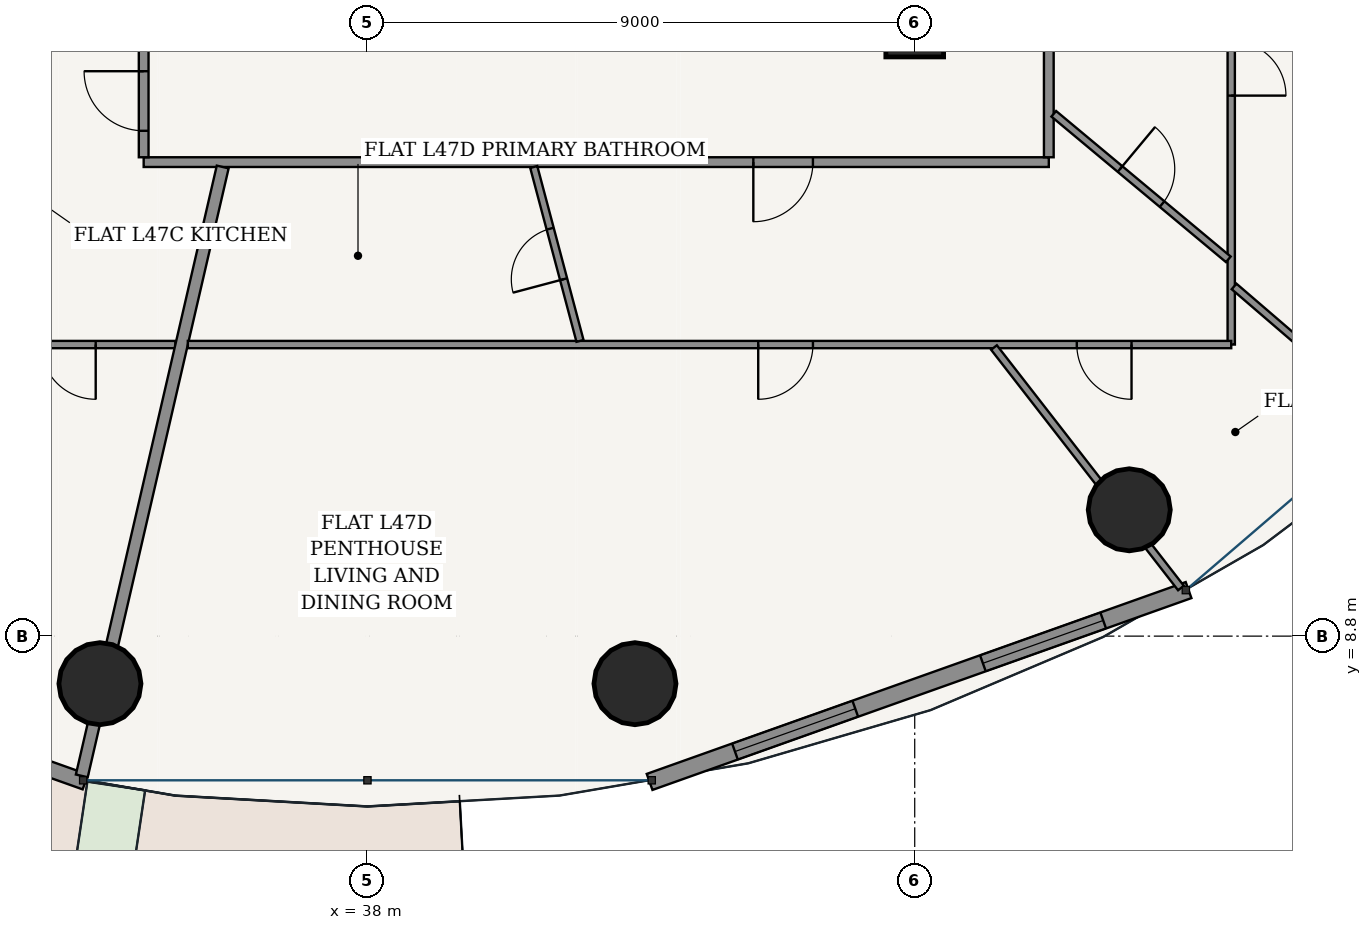
"""IFC4 building model, lengths in metres.
Left out: names, types, materials, properties, quantities, classifications, styles, units other than length and angle.
Written with IfcOpenShell. Run it as: python <this file> out.ifc"""

import sys

from ifc_helpers import new_model, si_unit, direction, frame, frame_2d, origin, origin_2d, place, context, subcontext, project, spatial, rectangle, hollow_circle, extrude, source, transform, mapped, element, fill, save


model = new_model("IFC4")
c1 = context("Model", 3, precision=1e-05, world=origin(), true_north=direction((-0.2419218956, 0.970295726276)))
c2 = subcontext(c1, "Body", "Model", "MODEL_VIEW")
j1 = project(units=[si_unit("LENGTHUNIT", "METRE"), si_unit("PLANEANGLEUNIT", "RADIAN")], contexts=[c1])
p1 = place(None, origin())
s1 = spatial("IfcSite", under=j1, at=p1, CompositionType="ELEMENT")
p2 = place(p1, origin())
s2 = spatial("IfcBuilding", under=s1, at=p2, CompositionType="ELEMENT")
p3 = place(p2, frame((0.0, 0.0, 178.6)))
s3 = spatial("IfcBuildingStorey", under=s2, at=p3, CompositionType="ELEMENT", Elevation=178.6)
p4 = place(p3, frame((47.0, 18.8, 0.0), z_axis=(0.0, 0.0, 1.0), x_axis=(1.0, 0.0, 0.0)))
e1 = element("IfcColumn", 1, at=p4, inside=s3, PredefinedType="COLUMN", context=c2, shape_type="SweptSolid", body=[
    extrude(rectangle(XDim=0.95, YDim=0.95, at=origin_2d()), origin(), (0.0, 0.0, 1.0), 3.6),
])
for number, where, z_axis, x_axis in (
    (2, (33.601, 8.018, 0.0), (0.0, 0.0, 1.0), (1.0, 0.0, 0.0)),
    (3, (42.399, 8.018, 0.0), (0.0, 0.0, 1.0), (1.0, 0.0, 0.0)),
    (4, (50.528, 10.877, 0.0), (0.0, 0.0, 1.0), (1.0, 0.0, 0.0)),
):
    element("IfcColumn", number, at=place(p3, frame(where, z_axis=z_axis, x_axis=x_axis)), inside=s3, PredefinedType="COLUMN", context=c2, shape_type="SweptSolid", body=[
        extrude(hollow_circle(Radius=0.675, WallThickness=0.042, at=origin_2d()), origin(), (0.0, 0.0, 1.0), 3.6),
    ])
p5 = place(p3, frame((24.497, 9.557, 0.0), z_axis=(0.0, 0.0, 1.0), x_axis=(0.942103604331, -0.335321932934, 0.0)))
e5 = element("IfcWall", 5, at=p5, inside=s3, PredefinedType="SOLIDWALL", context=c2, shape_type="SweptSolid", body=[
    extrude(rectangle(XDim=9.408, YDim=0.26, at=frame_2d((4.704, 0.0))), origin(), (0.0, 0.0, 1.0), 3.33),
])
p6 = place(p5, frame((4.029, 0.0, 0.0)))
e6 = element("IfcOpeningElement", 6, at=p6, cuts=e5, PredefinedType="OPENING", context=c2, shape_type="SweptSolid", body=[
    extrude(rectangle(XDim=1.35, YDim=2.2, at=frame_2d((0.675, 1.1))), frame((0.0, 0.14, 0.0), z_axis=(0.0, -1.0, 0.0), x_axis=(1.0, 0.0, 0.0)), (0.0, 0.0, 1.0), 0.28),
])
p7 = place(p3, frame((42.64, 6.402, 0.0), z_axis=(0.0, 0.0, 1.0), x_axis=(0.942103604331, 0.335321932934, 0.0)))
e7 = element("IfcWall", 7, at=p7, inside=s3, PredefinedType="SOLIDWALL", context=c2, shape_type="SweptSolid", body=[
    extrude(rectangle(XDim=9.408, YDim=0.28, at=frame_2d((4.704, 0.0))), origin(), (0.0, 0.0, 1.0), 3.33),
])
p8 = place(p7, frame((1.49, 0.0, 0.85)))
e8 = element("IfcOpeningElement", 8, at=p8, cuts=e7, PredefinedType="OPENING", context=c2, shape_type="SweptSolid", body=[
    extrude(rectangle(XDim=2.1, YDim=1.95, at=frame_2d((1.05, 0.975))), frame((0.0, 0.15, 0.0), z_axis=(0.0, -1.0, 0.0), x_axis=(1.0, 0.0, 0.0)), (0.0, 0.0, 1.0), 0.3),
])
p9 = place(p7, frame((5.818, 0.0, 0.85)))
e9 = element("IfcOpeningElement", 9, at=p9, cuts=e7, PredefinedType="OPENING", context=c2, shape_type="SweptSolid", body=[
    extrude(rectangle(XDim=2.1, YDim=1.95, at=frame_2d((1.05, 0.975))), frame((0.0, 0.15, 0.0), z_axis=(0.0, -1.0, 0.0), x_axis=(1.0, 0.0, 0.0)), (0.0, 0.0, 1.0), 0.3),
])
p10 = place(p3, frame((34.32, 16.595, 0.0), z_axis=(0.0, 0.0, 1.0), x_axis=(1.0, 0.0, 0.0)))
e10 = element("IfcWall", 10, at=p10, inside=s3, PredefinedType="PARTITIONING", context=c2, shape_type="SweptSolid", body=[
    extrude(rectangle(XDim=14.885, YDim=0.16, at=frame_2d((7.442, 0.0))), origin(), (0.0, 0.0, 1.0), 2.776),
])
p11 = place(p10, frame((10.026, 0.0, 0.0)))
e11 = element("IfcOpeningElement", 11, at=p11, cuts=e10, PredefinedType="OPENING", context=c2, shape_type="SweptSolid", body=[
    extrude(rectangle(XDim=0.98, YDim=2.2, at=frame_2d((0.49, 1.1))), frame((0.0, 0.09, 0.0), z_axis=(0.0, -1.0, 0.0), x_axis=(1.0, 0.0, 0.0)), (0.0, 0.0, 1.0), 0.18),
])
p12 = place(p3, frame((34.32, 16.675, 0.0), z_axis=(0.0, 0.0, 1.0), x_axis=(0.0, 1.0, 0.0)))
e12 = element("IfcWall", 12, at=p12, inside=s3, PredefinedType="PARTITIONING", context=c2, shape_type="SweptSolid", body=[
    extrude(rectangle(XDim=1.85, YDim=0.16, at=frame_2d((0.925, 0.0))), origin(), (0.0, 0.0, 1.0), 3.33),
])
p13 = place(p12, frame((0.435, 0.0, 0.0)))
e13 = element("IfcOpeningElement", 13, at=p13, cuts=e12, PredefinedType="OPENING", context=c2, shape_type="SweptSolid", body=[
    extrude(rectangle(XDim=0.98, YDim=2.2, at=frame_2d((0.49, 1.1))), frame((0.0, 0.09, 0.0), z_axis=(0.0, -1.0, 0.0), x_axis=(1.0, 0.0, 0.0)), (0.0, 0.0, 1.0), 0.18),
])
p14 = place(p3, frame((49.205, 16.675, 0.0), z_axis=(0.0, 0.0, 1.0), x_axis=(0.0, 1.0, 0.0)))
e14 = element("IfcWall", 14, at=p14, inside=s3, PredefinedType="PARTITIONING", context=c2, shape_type="SweptSolid", body=[
    extrude(rectangle(XDim=18.4, YDim=0.16, at=frame_2d((9.2, 0.0))), origin(), (0.0, 0.0, 1.0), 2.776),
])
p15 = place(p3, frame((34.842, 13.595, 0.0), z_axis=(0.0, 0.0, 1.0), x_axis=(-1.0, 0.0, 0.0)))
e15 = element("IfcWall", 15, at=p15, inside=s3, PredefinedType="PARTITIONING", context=c2, shape_type="SweptSolid", body=[
    extrude(rectangle(XDim=3.522, YDim=0.12, at=frame_2d((1.761, 0.0))), origin(), (0.0, 0.0, 1.0), 2.776),
])
p16 = place(p15, frame((1.311, 0.0, 0.0)))
e16 = element("IfcOpeningElement", 16, at=p16, cuts=e15, PredefinedType="OPENING", context=c2, shape_type="SweptSolid", body=[
    extrude(rectangle(XDim=0.9, YDim=2.15, at=frame_2d((0.45, 1.075))), frame((0.0, 0.07, 0.0), z_axis=(0.0, -1.0, 0.0), x_axis=(1.0, 0.0, 0.0)), (0.0, 0.0, 1.0), 0.14),
])
p17 = place(p3, frame((35.62, 16.515, 0.0), z_axis=(0.0, 0.0, 1.0), x_axis=(-0.225473598067, -0.974249278457, 0.0)))
e17 = element("IfcWall", 17, at=p17, inside=s3, PredefinedType="PARTITIONING", context=c2, shape_type="SweptSolid", body=[
    extrude(rectangle(XDim=10.278, YDim=0.2, at=frame_2d((5.139, 0.0))), origin(), (0.0, 0.0, 1.0), 2.776),
])
p18 = place(p3, frame((52.205, 21.641, 0.0), z_axis=(0.0, 0.0, 1.0), x_axis=(0.0, -1.0, 0.0)))
e18 = element("IfcWall", 18, at=p18, inside=s3, PredefinedType="PARTITIONING", context=c2, shape_type="SweptSolid", body=[
    extrude(rectangle(XDim=8.046, YDim=0.12, at=frame_2d((4.023, 0.0))), origin(), (0.0, 0.0, 1.0), 2.776),
])
p19 = place(p18, frame((3.052, 0.0, 0.0)))
e19 = element("IfcOpeningElement", 19, at=p19, cuts=e18, PredefinedType="OPENING", context=c2, shape_type="SweptSolid", body=[
    extrude(rectangle(XDim=0.9, YDim=2.15, at=frame_2d((0.45, 1.075))), frame((0.0, 0.07, 0.0), z_axis=(0.0, -1.0, 0.0), x_axis=(1.0, 0.0, 0.0)), (0.0, 0.0, 1.0), 0.14),
])
p20 = place(p3, frame((52.205, 13.595, 0.0), z_axis=(0.0, 0.0, 1.0), x_axis=(-1.0, 0.0, 0.0)))
e20 = element("IfcWall", 20, at=p20, inside=s3, PredefinedType="PARTITIONING", context=c2, shape_type="SweptSolid", body=[
    extrude(rectangle(XDim=17.159, YDim=0.12, at=frame_2d((8.58, 0.0))), origin(), (0.0, 0.0, 1.0), 2.776),
])
p21 = place(p20, frame((6.879, 0.0, 0.0)))
e21 = element("IfcOpeningElement", 21, at=p21, cuts=e20, PredefinedType="OPENING", context=c2, shape_type="SweptSolid", body=[
    extrude(rectangle(XDim=0.9, YDim=2.15, at=frame_2d((0.45, 1.075))), frame((0.0, 0.07, 0.0), z_axis=(0.0, -1.0, 0.0), x_axis=(1.0, 0.0, 0.0)), (0.0, 0.0, 1.0), 0.14),
])
p22 = place(p20, frame((1.64, 0.0, 0.0)))
e22 = element("IfcOpeningElement", 22, at=p22, cuts=e20, PredefinedType="OPENING", context=c2, shape_type="SweptSolid", body=[
    extrude(rectangle(XDim=0.9, YDim=2.15, at=frame_2d((0.45, 1.075))), frame((0.0, 0.07, 0.0), z_axis=(0.0, -1.0, 0.0), x_axis=(1.0, 0.0, 0.0)), (0.0, 0.0, 1.0), 0.14),
])
p23 = place(p3, frame((48.304, 13.546, 0.0), z_axis=(0.0, 0.0, 1.0), x_axis=(0.613734792328, -0.789512257464, 0.0)))
e23 = element("IfcWall", 23, at=p23, inside=s3, PredefinedType="PARTITIONING", context=c2, shape_type="SweptSolid", body=[
    extrude(rectangle(XDim=5.01, YDim=0.12, at=frame_2d((2.505, 0.0))), origin(), (0.0, 0.0, 1.0), 2.776),
])
p24 = place(p3, frame((52.252, 14.55, 0.0), z_axis=(0.0, 0.0, 1.0), x_axis=(0.758368113794, -0.651826513714, 0.0)))
e24 = element("IfcWall", 24, at=p24, inside=s3, PredefinedType="PARTITIONING", context=c2, shape_type="SweptSolid", body=[
    extrude(rectangle(XDim=3.708, YDim=0.12, at=frame_2d((1.854, 0.0))), origin(), (0.0, 0.0, 1.0), 2.846),
])
p25 = place(p3, frame((40.735, 16.515, 0.0), z_axis=(0.0, 0.0, 1.0), x_axis=(0.256989915822, -0.966414084731, 0.0)))
e25 = element("IfcWall", 25, at=p25, inside=s3, PredefinedType="PARTITIONING", context=c2, shape_type="SweptSolid", body=[
    extrude(rectangle(XDim=2.959, YDim=0.12, at=frame_2d((1.479, 0.0))), origin(), (0.0, 0.0, 1.0), 3.33),
])
p26 = place(p25, frame((1.05, 0.0, 0.0)))
e26 = element("IfcOpeningElement", 26, at=p26, cuts=e25, PredefinedType="OPENING", context=c2, shape_type="SweptSolid", body=[
    extrude(rectangle(XDim=0.86, YDim=2.15, at=frame_2d((0.43, 1.075))), frame((0.0, 0.07, 0.0), z_axis=(0.0, -1.0, 0.0), x_axis=(1.0, 0.0, 0.0)), (0.0, 0.0, 1.0), 0.14),
])
p27 = place(p3, frame((49.287, 17.39, 0.0), z_axis=(0.0, 0.0, 1.0), x_axis=(0.768065994597, -0.640370695725, 0.0)))
e27 = element("IfcWall", 27, at=p27, inside=s3, PredefinedType="PARTITIONING", context=c2, shape_type="SweptSolid", body=[
    extrude(rectangle(XDim=3.738, YDim=0.12, at=frame_2d((1.869, 0.0))), origin(), (0.0, 0.0, 1.0), 3.005),
])
p28 = place(p27, frame((1.419, 0.0, 0.0)))
e28 = element("IfcOpeningElement", 28, at=p28, cuts=e27, PredefinedType="OPENING", context=c2, shape_type="SweptSolid", body=[
    extrude(rectangle(XDim=0.9, YDim=2.15, at=frame_2d((0.45, 1.075))), frame((0.0, 0.07, 0.0), z_axis=(0.0, -1.0, 0.0), x_axis=(1.0, 0.0, 0.0)), (0.0, 0.0, 1.0), 0.14),
])
m1 = source(origin(), c2, "Body", "SweptSolid", [
    extrude(rectangle(XDim=2.1, YDim=1.95, at=frame_2d((1.05, 0.975))), frame((0.0, 0.03, 0.0), z_axis=(0.0, -1.0, 0.0), x_axis=(1.0, 0.0, 0.0)), (0.0, 0.0, 1.0), 0.06),
])
p29 = place(p8, origin())
e29 = element("IfcWindow", 29, at=p29, inside=s3, PartitioningType="SINGLE_PANEL", PredefinedType="WINDOW", context=c2, shape_type="MappedRepresentation", body=[
    mapped(m1, transform((0.0, 0.0, 0.0), scale=1.0)),
])
fill(e8, e29)
p30 = place(p9, origin())
e30 = element("IfcWindow", 30, at=p30, inside=s3, PartitioningType="SINGLE_PANEL", PredefinedType="WINDOW", context=c2, shape_type="MappedRepresentation", body=[
    mapped(m1, transform((0.0, 0.0, 0.0), scale=1.0)),
])
fill(e9, e30)
m2 = source(origin(), c2, "Body", "SweptSolid", [
    extrude(rectangle(XDim=0.98, YDim=2.2, at=frame_2d((0.49, 1.1))), frame((0.0, 0.025, 0.0), z_axis=(0.0, -1.0, 0.0), x_axis=(1.0, 0.0, 0.0)), (0.0, 0.0, 1.0), 0.05),
])
p31 = place(p13, origin())
e31 = element("IfcDoor", 31, at=p31, inside=s3, OperationType="SINGLE_SWING_RIGHT", PredefinedType="DOOR", context=c2, shape_type="MappedRepresentation", body=[
    mapped(m2, transform((0.0, 0.0, 0.0), scale=1.0)),
])
fill(e13, e31)
m3 = source(origin(), c2, "Body", "SweptSolid", [
    extrude(rectangle(XDim=0.9, YDim=2.15, at=frame_2d((0.45, 1.075))), frame((0.0, 0.025, 0.0), z_axis=(0.0, -1.0, 0.0), x_axis=(1.0, 0.0, 0.0)), (0.0, 0.0, 1.0), 0.05),
])
p32 = place(p16, origin())
e32 = element("IfcDoor", 32, at=p32, inside=s3, OperationType="SINGLE_SWING_LEFT", PredefinedType="DOOR", context=c2, shape_type="MappedRepresentation", body=[
    mapped(m3, transform((0.0, 0.0, 0.0), scale=1.0)),
])
fill(e16, e32)
p33 = place(p11, frame((0.98, 0.0, 0.0), z_axis=(0.0, 0.0, 1.0), x_axis=(-1.0, 0.0, 0.0)))
e33 = element("IfcDoor", 33, at=p33, inside=s3, OperationType="SINGLE_SWING_RIGHT", PredefinedType="DOOR", context=c2, shape_type="MappedRepresentation", body=[
    mapped(m2, transform((0.0, 0.0, 0.0), scale=1.0)),
])
fill(e11, e33)
m4 = source(origin(), c2, "Body", "SweptSolid", [
    extrude(rectangle(XDim=0.86, YDim=2.15, at=frame_2d((0.43, 1.075))), frame((0.0, 0.025, 0.0), z_axis=(0.0, -1.0, 0.0), x_axis=(1.0, 0.0, 0.0)), (0.0, 0.0, 1.0), 0.05),
])
p34 = place(p26, frame((0.86, 0.0, 0.0), z_axis=(0.0, 0.0, 1.0), x_axis=(-1.0, 0.0, 0.0)))
e34 = element("IfcDoor", 34, at=p34, inside=s3, OperationType="SINGLE_SWING_LEFT", PredefinedType="DOOR", context=c2, shape_type="MappedRepresentation", body=[
    mapped(m4, transform((0.0, 0.0, 0.0), scale=1.0)),
])
fill(e26, e34)
p35 = place(p21, origin())
e35 = element("IfcDoor", 35, at=p35, inside=s3, OperationType="SINGLE_SWING_RIGHT", PredefinedType="DOOR", context=c2, shape_type="MappedRepresentation", body=[
    mapped(m3, transform((0.0, 0.0, 0.0), scale=1.0)),
])
fill(e21, e35)
p36 = place(p28, origin())
e36 = element("IfcDoor", 36, at=p36, inside=s3, OperationType="SINGLE_SWING_LEFT", PredefinedType="DOOR", context=c2, shape_type="MappedRepresentation", body=[
    mapped(m3, transform((0.0, 0.0, 0.0), scale=1.0)),
])
fill(e28, e36)
p37 = place(p19, origin())
e37 = element("IfcDoor", 37, at=p37, inside=s3, OperationType="SINGLE_SWING_RIGHT", PredefinedType="DOOR", context=c2, shape_type="MappedRepresentation", body=[
    mapped(m3, transform((0.0, 0.0, 0.0), scale=1.0)),
])
fill(e19, e37)
p38 = place(p22, origin())
e38 = element("IfcDoor", 38, at=p38, inside=s3, OperationType="SINGLE_SWING_LEFT", PredefinedType="DOOR", context=c2, shape_type="MappedRepresentation", body=[
    mapped(m3, transform((0.0, 0.0, 0.0), scale=1.0)),
])
fill(e22, e38)
save(model, sys.argv[1])
